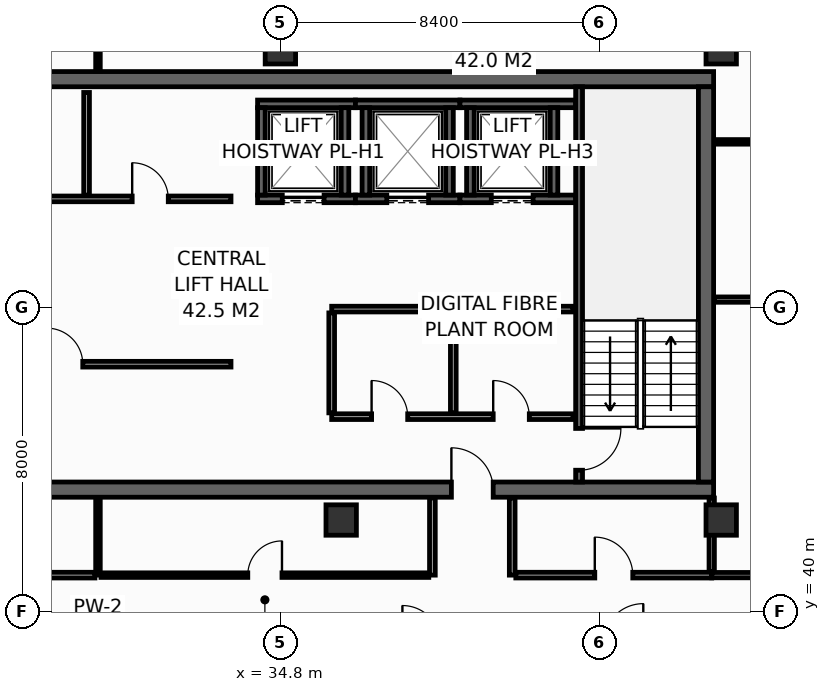
"""IFC4 building model, lengths in metres.
Left out: names, types, materials, properties, quantities, classifications, styles, units other than length and angle.
Written with IfcOpenShell. Run it as: python <this file> out.ifc"""

import sys

from ifc_helpers import new_model, si_unit, direction, frame, frame_2d, origin, origin_2d, place, context, subcontext, project, spatial, rectangle, hollow_rectangle, extrude, element, fill, save


model = new_model("IFC4")
c1 = context("Model", 3, precision=1e-05, world=origin(), true_north=direction((0.0, 1.0)))
c2 = subcontext(c1, "Body", "Model", "MODEL_VIEW")
j1 = project(units=[si_unit("LENGTHUNIT", "METRE"), si_unit("PLANEANGLEUNIT", "RADIAN")], contexts=[c1])
p1 = place(None, origin())
s1 = spatial("IfcSite", under=j1, at=p1, CompositionType="ELEMENT")
p2 = place(p1, origin())
s2 = spatial("IfcBuilding", under=s1, at=p2, CompositionType="ELEMENT")
p3 = place(p2, frame((0.0, 0.0, 230.6)))
s3 = spatial("IfcBuildingStorey", under=s2, at=p3, CompositionType="ELEMENT", Elevation=230.6)
p4 = place(p3, frame((13.7, 43.2, 0.0), z_axis=(0.0, 0.0, 1.0), x_axis=(1.0, 0.0, 0.0)))
e1 = element("IfcWall", 1, at=p4, inside=s3, PredefinedType="SHEAR", context=c2, shape_type="SweptSolid", body=[
    extrude(rectangle(XDim=32.5, YDim=0.4, at=frame_2d((16.25, 0.0))), origin(), (0.0, 0.0, 1.0), 3.55),
])
p5 = place(p4, frame((5.4, 0.0, 0.0)))
e2 = element("IfcOpeningElement", 2, at=p5, cuts=e1, PredefinedType="OPENING", context=c2, shape_type="SweptSolid", body=[
    extrude(rectangle(XDim=1.1, YDim=2.15, at=frame_2d((0.55, 1.075))), frame((0.0, 0.21, 0.0), z_axis=(0.0, -1.0, 0.0), x_axis=(1.0, 0.0, 0.0)), (0.0, 0.0, 1.0), 0.42),
])
p6 = place(p4, frame((25.6, 0.0, 0.0)))
e3 = element("IfcOpeningElement", 3, at=p6, cuts=e1, PredefinedType="OPENING", context=c2, shape_type="SweptSolid", body=[
    extrude(rectangle(XDim=1.1, YDim=2.15, at=frame_2d((0.55, 1.075))), frame((0.0, 0.21, 0.0), z_axis=(0.0, -1.0, 0.0), x_axis=(1.0, 0.0, 0.0)), (0.0, 0.0, 1.0), 0.42),
])
p7 = place(p3, frame((13.7, 54.0, 0.0), z_axis=(0.0, 0.0, 1.0), x_axis=(1.0, 0.0, 0.0)))
e4 = element("IfcWall", 4, at=p7, inside=s3, PredefinedType="SHEAR", context=c2, shape_type="SweptSolid", body=[
    extrude(rectangle(XDim=32.5, YDim=0.4, at=frame_2d((16.25, 0.0))), origin(), (0.0, 0.0, 1.0), 3.55),
])
p8 = place(p3, frame((46.0, 43.4, 0.0), z_axis=(0.0, 0.0, 1.0), x_axis=(0.0, 1.0, 0.0)))
e5 = element("IfcWall", 5, at=p8, inside=s3, PredefinedType="SHEAR", context=c2, shape_type="SweptSolid", body=[
    extrude(rectangle(XDim=10.4, YDim=0.4, at=frame_2d((5.2, 0.0))), origin(), (0.0, 0.0, 1.0), 3.55),
])
for number, where, z_axis, x_axis in (
    (6, (34.8, 54.8, 0.0), (0.0, 0.0, 1.0), (1.0, 0.0, 0.0)),
    (7, (46.4, 54.8, 0.0), (0.0, 0.0, 1.0), (1.0, 0.0, 0.0)),
    (8, (36.4, 42.4, 0.0), (0.0, 0.0, 1.0), (1.0, 0.0, 0.0)),
    (9, (46.4, 42.4, 0.0), (0.0, 0.0, 1.0), (1.0, 0.0, 0.0)),
):
    element("IfcColumn", number, at=place(p3, frame(where, z_axis=z_axis, x_axis=x_axis)), inside=s3, PredefinedType="COLUMN", context=c2, shape_type="SweptSolid", body=[
        extrude(hollow_rectangle(XDim=0.8, YDim=0.8, WallThickness=0.036, at=origin_2d()), origin(), (0.0, 0.0, 1.0), 3.8),
    ])
p9 = place(p3, frame((34.2, 50.85, 0.0), z_axis=(0.0, 0.0, 1.0), x_axis=(1.0, 0.0, 0.0)))
e10 = element("IfcWall", 10, at=p9, inside=s3, PredefinedType="SHEAR", context=c2, shape_type="SweptSolid", body=[
    extrude(rectangle(XDim=2.575, YDim=0.2, at=frame_2d((1.288, 0.0))), origin(), (0.0, 0.0, 1.0), 3.55),
])
p10 = place(p9, frame((0.65, 0.0, 0.0)))
e11 = element("IfcOpeningElement", 11, at=p10, cuts=e10, PredefinedType="OPENING", context=c2, shape_type="SweptSolid", body=[
    extrude(rectangle(XDim=1.1, YDim=2.2, at=frame_2d((0.55, 1.1))), frame((0.0, 0.11, 0.0), z_axis=(0.0, -1.0, 0.0), x_axis=(1.0, 0.0, 0.0)), (0.0, 0.0, 1.0), 0.22),
])
p11 = place(p3, frame((34.2, 53.35, 0.0), z_axis=(0.0, 0.0, 1.0), x_axis=(1.0, 0.0, 0.0)))
e12 = element("IfcWall", 12, at=p11, inside=s3, PredefinedType="SHEAR", context=c2, shape_type="SweptSolid", body=[
    extrude(rectangle(XDim=2.575, YDim=0.2, at=frame_2d((1.288, 0.0))), origin(), (0.0, 0.0, 1.0), 3.55),
])
for number, where, z_axis, x_axis in (
    (13, (34.3, 50.95, 0.0), (0.0, 0.0, 1.0), (0.0, 1.0, 0.0)),
    (14, (36.5, 50.95, 0.0), (0.0, 0.0, 1.0), (0.0, 1.0, 0.0)),
):
    element("IfcWall", number, at=place(p3, frame(where, z_axis=z_axis, x_axis=x_axis)), inside=s3, PredefinedType="SHEAR", context=c2, shape_type="SweptSolid", body=[
        extrude(rectangle(XDim=2.3, YDim=0.2, at=frame_2d((1.15, 0.0))), origin(), (0.0, 0.0, 1.0), 3.55),
    ])
p12 = place(p3, frame((36.775, 50.85, 0.0), z_axis=(0.0, 0.0, 1.0), x_axis=(1.0, 0.0, 0.0)))
e15 = element("IfcWall", 15, at=p12, inside=s3, PredefinedType="SHEAR", context=c2, shape_type="SweptSolid", body=[
    extrude(rectangle(XDim=2.75, YDim=0.2, at=frame_2d((1.375, 0.0))), origin(), (0.0, 0.0, 1.0), 3.55),
])
p13 = place(p12, frame((0.825, 0.0, 0.0)))
e16 = element("IfcOpeningElement", 16, at=p13, cuts=e15, PredefinedType="OPENING", context=c2, shape_type="SweptSolid", body=[
    extrude(rectangle(XDim=1.1, YDim=2.2, at=frame_2d((0.55, 1.1))), frame((0.0, 0.11, 0.0), z_axis=(0.0, -1.0, 0.0), x_axis=(1.0, 0.0, 0.0)), (0.0, 0.0, 1.0), 0.22),
])
p14 = place(p3, frame((36.775, 53.35, 0.0), z_axis=(0.0, 0.0, 1.0), x_axis=(1.0, 0.0, 0.0)))
e17 = element("IfcWall", 17, at=p14, inside=s3, PredefinedType="SHEAR", context=c2, shape_type="SweptSolid", body=[
    extrude(rectangle(XDim=2.75, YDim=0.2, at=frame_2d((1.375, 0.0))), origin(), (0.0, 0.0, 1.0), 3.55),
])
for number, where, z_axis, x_axis in (
    (18, (37.05, 50.95, 0.0), (0.0, 0.0, 1.0), (0.0, 1.0, 0.0)),
    (19, (39.25, 50.95, 0.0), (0.0, 0.0, 1.0), (0.0, 1.0, 0.0)),
):
    element("IfcWall", number, at=place(p3, frame(where, z_axis=z_axis, x_axis=x_axis)), inside=s3, PredefinedType="SHEAR", context=c2, shape_type="SweptSolid", body=[
        extrude(rectangle(XDim=2.3, YDim=0.2, at=frame_2d((1.15, 0.0))), origin(), (0.0, 0.0, 1.0), 3.55),
    ])
p15 = place(p3, frame((39.525, 50.85, 0.0), z_axis=(0.0, 0.0, 1.0), x_axis=(1.0, 0.0, 0.0)))
e20 = element("IfcWall", 20, at=p15, inside=s3, PredefinedType="SHEAR", context=c2, shape_type="SweptSolid", body=[
    extrude(rectangle(XDim=3.045, YDim=0.2, at=frame_2d((1.522, 0.0))), origin(), (0.0, 0.0, 1.0), 3.55),
])
p16 = place(p15, frame((0.825, 0.0, 0.0)))
e21 = element("IfcOpeningElement", 21, at=p16, cuts=e20, PredefinedType="OPENING", context=c2, shape_type="SweptSolid", body=[
    extrude(rectangle(XDim=1.1, YDim=2.2, at=frame_2d((0.55, 1.1))), frame((0.0, 0.11, 0.0), z_axis=(0.0, -1.0, 0.0), x_axis=(1.0, 0.0, 0.0)), (0.0, 0.0, 1.0), 0.22),
])
p17 = place(p3, frame((39.525, 53.35, 0.0), z_axis=(0.0, 0.0, 1.0), x_axis=(1.0, 0.0, 0.0)))
e22 = element("IfcWall", 22, at=p17, inside=s3, PredefinedType="SHEAR", context=c2, shape_type="SweptSolid", body=[
    extrude(rectangle(XDim=3.045, YDim=0.2, at=frame_2d((1.522, 0.0))), origin(), (0.0, 0.0, 1.0), 3.55),
])
for number, where, z_axis, x_axis in (
    (23, (39.8, 50.95, 0.0), (0.0, 0.0, 1.0), (0.0, 1.0, 0.0)),
    (24, (42.0, 50.95, 0.0), (0.0, 0.0, 1.0), (0.0, 1.0, 0.0)),
):
    element("IfcWall", number, at=place(p3, frame(where, z_axis=z_axis, x_axis=x_axis)), inside=s3, PredefinedType="SHEAR", context=c2, shape_type="SweptSolid", body=[
        extrude(rectangle(XDim=2.3, YDim=0.2, at=frame_2d((1.15, 0.0))), origin(), (0.0, 0.0, 1.0), 3.55),
    ])
p18 = place(p3, frame((42.66, 53.8, 0.0), z_axis=(0.0, 0.0, 1.0), x_axis=(0.0, -1.0, 0.0)))
e25 = element("IfcWall", 25, at=p18, inside=s3, PredefinedType="SHEAR", context=c2, shape_type="SweptSolid", body=[
    extrude(rectangle(XDim=10.4, YDim=0.18, at=frame_2d((5.2, 0.0))), origin(), (0.0, 0.0, 1.0), 3.55),
])
p19 = place(p18, frame((8.99, 0.0, 0.0)))
e26 = element("IfcOpeningElement", 26, at=p19, cuts=e25, PredefinedType="OPENING", context=c2, shape_type="SweptSolid", body=[
    extrude(rectangle(XDim=1.1, YDim=2.15, at=frame_2d((0.55, 1.075))), frame((0.0, 0.1, 0.0), z_axis=(0.0, -1.0, 0.0), x_axis=(1.0, 0.0, 0.0)), (0.0, 0.0, 1.0), 0.2),
])
p20 = place(p3, frame((36.15, 45.12, 0.0), z_axis=(0.0, 0.0, 1.0), x_axis=(1.0, 0.0, 0.0)))
e27 = element("IfcWall", 27, at=p20, inside=s3, PredefinedType="PARTITIONING", context=c2, shape_type="SweptSolid", body=[
    extrude(rectangle(XDim=6.35, YDim=0.15, at=frame_2d((3.175, 0.0))), origin(), (0.0, 0.0, 1.0), 3.55),
])
p21 = place(p20, frame((1.05, 0.0, 0.0)))
e28 = element("IfcOpeningElement", 28, at=p21, cuts=e27, PredefinedType="OPENING", context=c2, shape_type="SweptSolid", body=[
    extrude(rectangle(XDim=0.95, YDim=2.15, at=frame_2d((0.475, 1.075))), frame((0.0, 0.085, 0.0), z_axis=(0.0, -1.0, 0.0), x_axis=(1.0, 0.0, 0.0)), (0.0, 0.0, 1.0), 0.17),
])
p22 = place(p20, frame((4.25, 0.0, 0.0)))
e29 = element("IfcOpeningElement", 29, at=p22, cuts=e27, PredefinedType="OPENING", context=c2, shape_type="SweptSolid", body=[
    extrude(rectangle(XDim=0.95, YDim=2.15, at=frame_2d((0.475, 1.075))), frame((0.0, 0.085, 0.0), z_axis=(0.0, -1.0, 0.0), x_axis=(1.0, 0.0, 0.0)), (0.0, 0.0, 1.0), 0.17),
])
p23 = place(p3, frame((36.15, 47.95, 0.0), z_axis=(0.0, 0.0, 1.0), x_axis=(1.0, 0.0, 0.0)))
e30 = element("IfcWall", 30, at=p23, inside=s3, PredefinedType="PARTITIONING", context=c2, shape_type="SweptSolid", body=[
    extrude(rectangle(XDim=6.35, YDim=0.15, at=frame_2d((3.175, 0.0))), origin(), (0.0, 0.0, 1.0), 3.55),
])
for number, where, z_axis, x_axis in (
    (31, (36.15, 45.22, 0.0), (0.0, 0.0, 1.0), (0.0, 1.0, 0.0)),
    (32, (39.35, 45.22, 0.0), (0.0, 0.0, 1.0), (0.0, 1.0, 0.0)),
):
    element("IfcWall", number, at=place(p3, frame(where, z_axis=z_axis, x_axis=x_axis)), inside=s3, PredefinedType="PARTITIONING", context=c2, shape_type="SweptSolid", body=[
        extrude(rectangle(XDim=2.63, YDim=0.15, at=frame_2d((1.315, 0.0))), origin(), (0.0, 0.0, 1.0), 3.55),
    ])
p24 = place(p3, frame((25.85, 50.85, 0.0), z_axis=(0.0, 0.0, 1.0), x_axis=(1.0, 0.0, 0.0)))
e33 = element("IfcWall", 33, at=p24, inside=s3, PredefinedType="PARTITIONING", context=c2, shape_type="SweptSolid", body=[
    extrude(rectangle(XDim=7.65, YDim=0.15, at=frame_2d((3.825, 0.0))), origin(), (0.0, 0.0, 1.0), 3.55),
])
p25 = place(p24, frame((1.25, 0.0, 0.0)))
e34 = element("IfcOpeningElement", 34, at=p25, cuts=e33, PredefinedType="OPENING", context=c2, shape_type="SweptSolid", body=[
    extrude(rectangle(XDim=0.95, YDim=2.15, at=frame_2d((0.475, 1.075))), frame((0.0, 0.085, 0.0), z_axis=(0.0, -1.0, 0.0), x_axis=(1.0, 0.0, 0.0)), (0.0, 0.0, 1.0), 0.17),
])
p26 = place(p24, frame((5.05, 0.0, 0.0)))
e35 = element("IfcOpeningElement", 35, at=p26, cuts=e33, PredefinedType="OPENING", context=c2, shape_type="SweptSolid", body=[
    extrude(rectangle(XDim=0.95, YDim=2.15, at=frame_2d((0.475, 1.075))), frame((0.0, 0.085, 0.0), z_axis=(0.0, -1.0, 0.0), x_axis=(1.0, 0.0, 0.0)), (0.0, 0.0, 1.0), 0.17),
])
p27 = place(p3, frame((29.7, 50.95, 0.0), z_axis=(0.0, 0.0, 1.0), x_axis=(0.0, 1.0, 0.0)))
e36 = element("IfcWall", 36, at=p27, inside=s3, PredefinedType="PARTITIONING", context=c2, shape_type="SweptSolid", body=[
    extrude(rectangle(XDim=2.7, YDim=0.15, at=frame_2d((1.35, 0.0))), origin(), (0.0, 0.0, 1.0), 3.55),
])
p28 = place(p3, frame((25.85, 46.5, 0.0), z_axis=(0.0, 0.0, 1.0), x_axis=(1.0, 0.0, 0.0)))
e37 = element("IfcWall", 37, at=p28, inside=s3, PredefinedType="PARTITIONING", context=c2, shape_type="SweptSolid", body=[
    extrude(rectangle(XDim=7.65, YDim=0.15, at=frame_2d((3.825, 0.0))), origin(), (0.0, 0.0, 1.0), 3.55),
])
p29 = place(p28, frame((2.8, 0.0, 0.0)))
e38 = element("IfcOpeningElement", 38, at=p29, cuts=e37, PredefinedType="OPENING", context=c2, shape_type="SweptSolid", body=[
    extrude(rectangle(XDim=0.95, YDim=2.15, at=frame_2d((0.475, 1.075))), frame((0.0, 0.085, 0.0), z_axis=(0.0, -1.0, 0.0), x_axis=(1.0, 0.0, 0.0)), (0.0, 0.0, 1.0), 0.17),
])
p30 = place(p3, frame((46.15, 40.95, 0.0), z_axis=(0.0, 0.0, 1.0), x_axis=(1.0, 0.0, 0.0)))
e39 = element("IfcWall", 39, at=p30, inside=s3, PredefinedType="PARTITIONING", context=c2, shape_type="SweptSolid", body=[
    extrude(rectangle(XDim=4.05, YDim=0.14, at=frame_2d((2.025, 0.0))), origin(), (0.0, 0.0, 1.0), 3.55),
])
p31 = place(p3, frame((46.15, 41.04, 0.0), z_axis=(0.0, 0.0, 1.0), x_axis=(0.0, 1.0, 0.0)))
e40 = element("IfcWall", 40, at=p31, inside=s3, PredefinedType="PARTITIONING", context=c2, shape_type="SweptSolid", body=[
    extrude(rectangle(XDim=1.94, YDim=0.14, at=frame_2d((0.97, 0.0))), origin(), (0.0, 0.0, 1.0), 3.55),
])
p32 = place(p3, frame((46.22, 48.2, 0.0), z_axis=(0.0, 0.0, 1.0), x_axis=(1.0, 0.0, 0.0)))
e41 = element("IfcWall", 41, at=p32, inside=s3, PredefinedType="PARTITIONING", context=c2, shape_type="SweptSolid", body=[
    extrude(rectangle(XDim=3.98, YDim=0.14, at=frame_2d((1.99, 0.0))), origin(), (0.0, 0.0, 1.0), 3.55),
])
p33 = place(p3, frame((46.22, 52.35, 0.0), z_axis=(0.0, 0.0, 1.0), x_axis=(1.0, 0.0, 0.0)))
e42 = element("IfcWall", 42, at=p33, inside=s3, PredefinedType="PARTITIONING", context=c2, shape_type="SweptSolid", body=[
    extrude(rectangle(XDim=3.98, YDim=0.12, at=frame_2d((1.99, 0.0))), origin(), (0.0, 0.0, 1.0), 3.55),
])
p34 = place(p3, frame((30.0, 54.22, 0.0), z_axis=(0.0, 0.0, 1.0), x_axis=(0.0, 1.0, 0.0)))
e43 = element("IfcWall", 43, at=p34, inside=s3, PredefinedType="PARTITIONING", context=c2, shape_type="SweptSolid", body=[
    extrude(rectangle(XDim=1.775, YDim=0.12, at=frame_2d((0.888, 0.0))), origin(), (0.0, 0.0, 1.0), 2.935),
])
for number, where, z_axis, x_axis in (
    (44, (38.8, 40.95, 0.0), (0.0, 0.0, 1.0), (0.0, 1.0, 0.0)),
    (45, (40.9, 40.95, 0.0), (0.0, 0.0, 1.0), (0.0, 1.0, 0.0)),
):
    element("IfcWall", number, at=place(p3, frame(where, z_axis=z_axis, x_axis=x_axis)), inside=s3, PredefinedType="PARTITIONING", context=c2, shape_type="SweptSolid", body=[
        extrude(rectangle(XDim=2.03, YDim=0.15, at=frame_2d((1.015, 0.0))), origin(), (0.0, 0.0, 1.0), 3.55),
    ])
p35 = place(p3, frame((30.0, 40.95, 0.0), z_axis=(0.0, 0.0, 1.0), x_axis=(0.0, 1.0, 0.0)))
e46 = element("IfcWall", 46, at=p35, inside=s3, PredefinedType="PARTITIONING", context=c2, shape_type="SweptSolid", body=[
    extrude(rectangle(XDim=2.03, YDim=0.12, at=frame_2d((1.015, 0.0))), origin(), (0.0, 0.0, 1.0), 2.947),
])
p36 = place(p3, frame((20.795, 40.95, 0.0), z_axis=(0.0, 0.0, 1.0), x_axis=(1.0, 0.0, 0.0)))
e47 = element("IfcWall", 47, at=p36, inside=s3, PredefinedType="PARTITIONING", context=c2, shape_type="SweptSolid", body=[
    extrude(rectangle(XDim=9.125, YDim=0.15, at=frame_2d((4.562, 0.0))), origin(), (0.0, 0.0, 1.0), 2.947),
])
p37 = place(p36, frame((4.062, 0.0, 0.0)))
e48 = element("IfcOpeningElement", 48, at=p37, cuts=e47, PredefinedType="OPENING", context=c2, shape_type="SweptSolid", body=[
    extrude(rectangle(XDim=1.0, YDim=2.15, at=frame_2d((0.5, 1.075))), frame((0.0, 0.085, 0.0), z_axis=(0.0, -1.0, 0.0), x_axis=(1.0, 0.0, 0.0)), (0.0, 0.0, 1.0), 0.17),
])
p38 = place(p3, frame((30.08, 40.95, 0.0), z_axis=(0.0, 0.0, 1.0), x_axis=(1.0, 0.0, 0.0)))
e49 = element("IfcWall", 49, at=p38, inside=s3, PredefinedType="PARTITIONING", context=c2, shape_type="SweptSolid", body=[
    extrude(rectangle(XDim=8.625, YDim=0.12, at=frame_2d((4.312, 0.0))), origin(), (0.0, 0.0, 1.0), 2.947),
])
p39 = place(p38, frame((3.862, 0.0, 0.0)))
e50 = element("IfcOpeningElement", 50, at=p39, cuts=e49, PredefinedType="OPENING", context=c2, shape_type="SweptSolid", body=[
    extrude(rectangle(XDim=0.9, YDim=2.1, at=frame_2d((0.45, 1.05))), frame((0.0, 0.07, 0.0), z_axis=(0.0, -1.0, 0.0), x_axis=(1.0, 0.0, 0.0)), (0.0, 0.0, 1.0), 0.14),
])
p40 = place(p3, frame((40.995, 40.95, 0.0), z_axis=(0.0, 0.0, 1.0), x_axis=(1.0, 0.0, 0.0)))
e51 = element("IfcWall", 51, at=p40, inside=s3, PredefinedType="PARTITIONING", context=c2, shape_type="SweptSolid", body=[
    extrude(rectangle(XDim=5.155, YDim=0.15, at=frame_2d((2.577, 0.0))), origin(), (0.0, 0.0, 1.0), 3.55),
])
p41 = place(p40, frame((2.078, 0.0, 0.0)))
e52 = element("IfcOpeningElement", 52, at=p41, cuts=e51, PredefinedType="OPENING", context=c2, shape_type="SweptSolid", body=[
    extrude(rectangle(XDim=1.0, YDim=2.15, at=frame_2d((0.5, 1.075))), frame((0.0, 0.085, 0.0), z_axis=(0.0, -1.0, 0.0), x_axis=(1.0, 0.0, 0.0)), (0.0, 0.0, 1.0), 0.17),
])
p42 = place(p10, origin())
e53 = element("IfcDoor", 53, at=p42, inside=s3, OperationType="SLIDING_TO_LEFT", PredefinedType="DOOR", context=c2, shape_type="SweptSolid", body=[
    extrude(rectangle(XDim=1.1, YDim=2.2, at=frame_2d((0.55, 1.1))), frame((0.0, 0.025, 0.0), z_axis=(0.0, -1.0, 0.0), x_axis=(1.0, 0.0, 0.0)), (0.0, 0.0, 1.0), 0.05),
])
fill(e11, e53)
p43 = place(p13, origin())
e54 = element("IfcDoor", 54, at=p43, inside=s3, OperationType="SLIDING_TO_LEFT", PredefinedType="DOOR", context=c2, shape_type="SweptSolid", body=[
    extrude(rectangle(XDim=1.1, YDim=2.2, at=frame_2d((0.55, 1.1))), frame((0.0, 0.025, 0.0), z_axis=(0.0, -1.0, 0.0), x_axis=(1.0, 0.0, 0.0)), (0.0, 0.0, 1.0), 0.05),
])
fill(e16, e54)
p44 = place(p16, origin())
e55 = element("IfcDoor", 55, at=p44, inside=s3, OperationType="SLIDING_TO_LEFT", PredefinedType="DOOR", context=c2, shape_type="SweptSolid", body=[
    extrude(rectangle(XDim=1.1, YDim=2.2, at=frame_2d((0.55, 1.1))), frame((0.0, 0.025, 0.0), z_axis=(0.0, -1.0, 0.0), x_axis=(1.0, 0.0, 0.0)), (0.0, 0.0, 1.0), 0.05),
])
fill(e21, e55)
p45 = place(p19, origin())
e56 = element("IfcDoor", 56, at=p45, inside=s3, OperationType="SINGLE_SWING_LEFT", PredefinedType="DOOR", context=c2, shape_type="SweptSolid", body=[
    extrude(rectangle(XDim=1.1, YDim=2.15, at=frame_2d((0.55, 1.075))), frame((0.0, 0.025, 0.0), z_axis=(0.0, -1.0, 0.0), x_axis=(1.0, 0.0, 0.0)), (0.0, 0.0, 1.0), 0.05),
])
fill(e26, e56)
p46 = place(p6, origin())
e57 = element("IfcDoor", 57, at=p46, inside=s3, OperationType="SINGLE_SWING_LEFT", PredefinedType="DOOR", context=c2, shape_type="SweptSolid", body=[
    extrude(rectangle(XDim=1.1, YDim=2.15, at=frame_2d((0.55, 1.075))), frame((0.0, 0.025, 0.0), z_axis=(0.0, -1.0, 0.0), x_axis=(1.0, 0.0, 0.0)), (0.0, 0.0, 1.0), 0.05),
])
fill(e3, e57)
p47 = place(p21, origin())
e58 = element("IfcDoor", 58, at=p47, inside=s3, OperationType="SINGLE_SWING_LEFT", PredefinedType="DOOR", context=c2, shape_type="SweptSolid", body=[
    extrude(rectangle(XDim=0.95, YDim=2.15, at=frame_2d((0.475, 1.075))), frame((0.0, 0.025, 0.0), z_axis=(0.0, -1.0, 0.0), x_axis=(1.0, 0.0, 0.0)), (0.0, 0.0, 1.0), 0.05),
])
fill(e28, e58)
p48 = place(p22, origin())
e59 = element("IfcDoor", 59, at=p48, inside=s3, OperationType="SINGLE_SWING_LEFT", PredefinedType="DOOR", context=c2, shape_type="SweptSolid", body=[
    extrude(rectangle(XDim=0.95, YDim=2.15, at=frame_2d((0.475, 1.075))), frame((0.0, 0.025, 0.0), z_axis=(0.0, -1.0, 0.0), x_axis=(1.0, 0.0, 0.0)), (0.0, 0.0, 1.0), 0.05),
])
fill(e29, e59)
p49 = place(p26, origin())
e60 = element("IfcDoor", 60, at=p49, inside=s3, OperationType="SINGLE_SWING_LEFT", PredefinedType="DOOR", context=c2, shape_type="SweptSolid", body=[
    extrude(rectangle(XDim=0.95, YDim=2.15, at=frame_2d((0.475, 1.075))), frame((0.0, 0.025, 0.0), z_axis=(0.0, -1.0, 0.0), x_axis=(1.0, 0.0, 0.0)), (0.0, 0.0, 1.0), 0.05),
])
fill(e35, e60)
p50 = place(p29, origin())
e61 = element("IfcDoor", 61, at=p50, inside=s3, OperationType="SINGLE_SWING_LEFT", PredefinedType="DOOR", context=c2, shape_type="SweptSolid", body=[
    extrude(rectangle(XDim=0.95, YDim=2.15, at=frame_2d((0.475, 1.075))), frame((0.0, 0.025, 0.0), z_axis=(0.0, -1.0, 0.0), x_axis=(1.0, 0.0, 0.0)), (0.0, 0.0, 1.0), 0.05),
])
fill(e38, e61)
p51 = place(p39, origin())
e62 = element("IfcDoor", 62, at=p51, inside=s3, OperationType="SINGLE_SWING_RIGHT", PredefinedType="DOOR", context=c2, shape_type="SweptSolid", body=[
    extrude(rectangle(XDim=0.9, YDim=2.1, at=frame_2d((0.45, 1.05))), frame((0.0, 0.025, 0.0), z_axis=(0.0, -1.0, 0.0), x_axis=(1.0, 0.0, 0.0)), (0.0, 0.0, 1.0), 0.05),
])
fill(e50, e62)
p52 = place(p41, origin())
e63 = element("IfcDoor", 63, at=p52, inside=s3, OperationType="SINGLE_SWING_LEFT", PredefinedType="DOOR", context=c2, shape_type="SweptSolid", body=[
    extrude(rectangle(XDim=1.0, YDim=2.15, at=frame_2d((0.5, 1.075))), frame((0.0, 0.025, 0.0), z_axis=(0.0, -1.0, 0.0), x_axis=(1.0, 0.0, 0.0)), (0.0, 0.0, 1.0), 0.05),
])
fill(e52, e63)
save(model, sys.argv[1])
